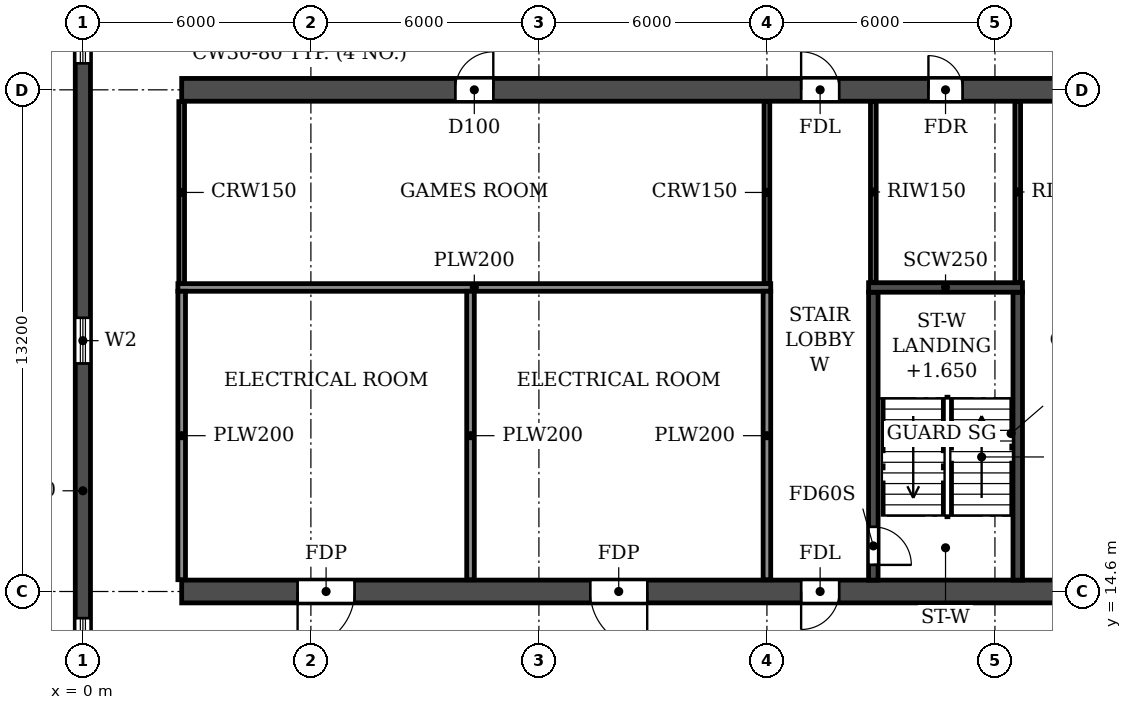
"""IFC4 building model, lengths in metres.
Left out: names, types, materials, properties, quantities, classifications, styles, units other than length and angle.
Written with IfcOpenShell. Run it as: python <this file> out.ifc"""

import sys

from ifc_helpers import new_model, si_unit, direction, frame, frame_2d, origin, place, context, subcontext, project, spatial, rectangle, extrude, element, fill, save


model = new_model("IFC4")
c1 = context("Model", 3, precision=1e-05, world=origin(), true_north=direction((0.0, 1.0)))
c2 = subcontext(c1, "Body", "Model", "MODEL_VIEW")
j1 = project(units=[si_unit("LENGTHUNIT", "METRE"), si_unit("PLANEANGLEUNIT", "RADIAN")], contexts=[c1])
p1 = place(None, origin())
s1 = spatial("IfcSite", under=j1, at=p1, CompositionType="ELEMENT")
p2 = place(p1, origin())
s2 = spatial("IfcBuilding", under=s1, at=p2, CompositionType="ELEMENT")
p3 = place(p2, frame((0.0, 0.0, 49.8)))
s3 = spatial("IfcBuildingStorey", under=s2, at=p3, CompositionType="ELEMENT", Elevation=49.8)
p4 = place(p3, frame((0.0, 4.683, 0.0), z_axis=(0.0, 0.0, 1.0), x_axis=(0.0, 1.0, 0.0)))
e1 = element("IfcWall", 1, at=p4, inside=s3, PredefinedType="SHEAR", context=c2, shape_type="SweptSolid", body=[
    extrude(rectangle(XDim=35.434, YDim=0.4, at=frame_2d((17.717, 0.0))), origin(), (0.0, 0.0, 1.0), 3.0),
])
p5 = place(p4, frame((23.817, 0.0, 0.9)))
e2 = element("IfcOpeningElement", 2, at=p5, cuts=e1, PredefinedType="OPENING", context=c2, shape_type="SweptSolid", body=[
    extrude(rectangle(XDim=1.2, YDim=1.5, at=frame_2d((0.6, 0.75))), frame((0.0, 0.21, 0.0), z_axis=(0.0, -1.0, 0.0), x_axis=(1.0, 0.0, 0.0)), (0.0, 0.0, 1.0), 0.42),
])
p6 = place(p4, frame((8.017, 0.0, 0.9)))
e3 = element("IfcOpeningElement", 3, at=p6, cuts=e1, PredefinedType="OPENING", context=c2, shape_type="SweptSolid", body=[
    extrude(rectangle(XDim=1.2, YDim=1.5, at=frame_2d((0.6, 0.75))), frame((0.0, 0.21, 0.0), z_axis=(0.0, -1.0, 0.0), x_axis=(1.0, 0.0, 0.0)), (0.0, 0.0, 1.0), 0.42),
])
p7 = place(p4, frame((15.917, 0.0, 0.9)))
e4 = element("IfcOpeningElement", 4, at=p7, cuts=e1, PredefinedType="OPENING", context=c2, shape_type="SweptSolid", body=[
    extrude(rectangle(XDim=1.2, YDim=1.5, at=frame_2d((0.6, 0.75))), frame((0.0, 0.21, 0.0), z_axis=(0.0, -1.0, 0.0), x_axis=(1.0, 0.0, 0.0)), (0.0, 0.0, 1.0), 0.42),
])
p8 = place(p4, frame((29.493, 0.0, 0.6)))
e5 = element("IfcOpeningElement", 5, at=p8, cuts=e1, PredefinedType="OPENING", context=c2, shape_type="SweptSolid", body=[
    extrude(rectangle(XDim=2.2, YDim=1.8, at=frame_2d((1.1, 0.9))), frame((0.0, 0.21, 0.0), z_axis=(0.0, -1.0, 0.0), x_axis=(1.0, 0.0, 0.0)), (0.0, 0.0, 1.0), 0.42),
])
p9 = place(p4, frame((2.541, 0.0, 0.6)))
e6 = element("IfcOpeningElement", 6, at=p9, cuts=e1, PredefinedType="OPENING", context=c2, shape_type="SweptSolid", body=[
    extrude(rectangle(XDim=2.2, YDim=1.8, at=frame_2d((1.1, 0.9))), frame((0.0, 0.21, 0.0), z_axis=(0.0, -1.0, 0.0), x_axis=(1.0, 0.0, 0.0)), (0.0, 0.0, 1.0), 0.42),
])
p10 = place(p3, frame((2.6, 14.6, 0.0), z_axis=(0.0, 0.0, 1.0), x_axis=(1.0, 0.0, 0.0)))
e7 = element("IfcWall", 7, at=p10, inside=s3, PredefinedType="SOLIDWALL", context=c2, shape_type="SweptSolid", body=[
    extrude(rectangle(XDim=96.8, YDim=0.6, at=frame_2d((48.4, 0.0))), origin(), (0.0, 0.0, 1.0), 3.0),
])
p11 = place(p10, frame((3.05, 0.0, 0.0)))
e8 = element("IfcOpeningElement", 8, at=p11, cuts=e7, PredefinedType="OPENING", context=c2, shape_type="SweptSolid", body=[
    extrude(rectangle(XDim=1.5, YDim=2.1, at=frame_2d((0.75, 1.05))), frame((0.0, 0.31, 0.0), z_axis=(0.0, -1.0, 0.0), x_axis=(1.0, 0.0, 0.0)), (0.0, 0.0, 1.0), 0.62),
])
p12 = place(p10, frame((10.75, 0.0, 0.0)))
e9 = element("IfcOpeningElement", 9, at=p12, cuts=e7, PredefinedType="OPENING", context=c2, shape_type="SweptSolid", body=[
    extrude(rectangle(XDim=1.5, YDim=2.1, at=frame_2d((0.75, 1.05))), frame((0.0, 0.31, 0.0), z_axis=(0.0, -1.0, 0.0), x_axis=(1.0, 0.0, 0.0)), (0.0, 0.0, 1.0), 0.62),
])
p13 = place(p10, frame((16.3, 0.0, 0.0)))
e10 = element("IfcOpeningElement", 10, at=p13, cuts=e7, PredefinedType="OPENING", context=c2, shape_type="SweptSolid", body=[
    extrude(rectangle(XDim=1.0, YDim=2.1, at=frame_2d((0.5, 1.05))), frame((0.0, 0.31, 0.0), z_axis=(0.0, -1.0, 0.0), x_axis=(1.0, 0.0, 0.0)), (0.0, 0.0, 1.0), 0.62),
])
p14 = place(p10, frame((24.2, 0.0, 0.0)))
e11 = element("IfcOpeningElement", 11, at=p14, cuts=e7, PredefinedType="OPENING", context=c2, shape_type="SweptSolid", body=[
    extrude(rectangle(XDim=1.0, YDim=2.1, at=frame_2d((0.5, 1.05))), frame((0.0, 0.31, 0.0), z_axis=(0.0, -1.0, 0.0), x_axis=(1.0, 0.0, 0.0)), (0.0, 0.0, 1.0), 0.62),
])
p15 = place(p10, frame((28.8, 0.0, 0.0)))
e12 = element("IfcOpeningElement", 12, at=p15, cuts=e7, PredefinedType="OPENING", context=c2, shape_type="SweptSolid", body=[
    extrude(rectangle(XDim=1.0, YDim=2.1, at=frame_2d((0.5, 1.05))), frame((0.0, 0.31, 0.0), z_axis=(0.0, -1.0, 0.0), x_axis=(1.0, 0.0, 0.0)), (0.0, 0.0, 1.0), 0.62),
])
p16 = place(p10, frame((42.7, 0.0, 0.0)))
e13 = element("IfcOpeningElement", 13, at=p16, cuts=e7, PredefinedType="OPENING", context=c2, shape_type="SweptSolid", body=[
    extrude(rectangle(XDim=1.0, YDim=2.1, at=frame_2d((0.5, 1.05))), frame((0.0, 0.31, 0.0), z_axis=(0.0, -1.0, 0.0), x_axis=(1.0, 0.0, 0.0)), (0.0, 0.0, 1.0), 0.62),
])
p17 = place(p10, frame((47.9, 0.0, 0.0)))
e14 = element("IfcOpeningElement", 14, at=p17, cuts=e7, PredefinedType="OPENING", context=c2, shape_type="SweptSolid", body=[
    extrude(rectangle(XDim=1.0, YDim=2.1, at=frame_2d((0.5, 1.05))), frame((0.0, 0.31, 0.0), z_axis=(0.0, -1.0, 0.0), x_axis=(1.0, 0.0, 0.0)), (0.0, 0.0, 1.0), 0.62),
])
p18 = place(p10, frame((51.8, 0.0, 0.0)))
e15 = element("IfcOpeningElement", 15, at=p18, cuts=e7, PredefinedType="OPENING", context=c2, shape_type="SweptSolid", body=[
    extrude(rectangle(XDim=1.0, YDim=2.1, at=frame_2d((0.5, 1.05))), frame((0.0, 0.31, 0.0), z_axis=(0.0, -1.0, 0.0), x_axis=(1.0, 0.0, 0.0)), (0.0, 0.0, 1.0), 0.62),
])
p19 = place(p10, frame((55.7, 0.0, 0.0)))
e16 = element("IfcOpeningElement", 16, at=p19, cuts=e7, PredefinedType="OPENING", context=c2, shape_type="SweptSolid", body=[
    extrude(rectangle(XDim=1.0, YDim=2.1, at=frame_2d((0.5, 1.05))), frame((0.0, 0.31, 0.0), z_axis=(0.0, -1.0, 0.0), x_axis=(1.0, 0.0, 0.0)), (0.0, 0.0, 1.0), 0.62),
])
p20 = place(p10, frame((67.0, 0.0, 0.0)))
e17 = element("IfcOpeningElement", 17, at=p20, cuts=e7, PredefinedType="OPENING", context=c2, shape_type="SweptSolid", body=[
    extrude(rectangle(XDim=1.0, YDim=2.1, at=frame_2d((0.5, 1.05))), frame((0.0, 0.31, 0.0), z_axis=(0.0, -1.0, 0.0), x_axis=(1.0, 0.0, 0.0)), (0.0, 0.0, 1.0), 0.62),
])
p21 = place(p10, frame((71.6, 0.0, 0.0)))
e18 = element("IfcOpeningElement", 18, at=p21, cuts=e7, PredefinedType="OPENING", context=c2, shape_type="SweptSolid", body=[
    extrude(rectangle(XDim=1.0, YDim=2.1, at=frame_2d((0.5, 1.05))), frame((0.0, 0.31, 0.0), z_axis=(0.0, -1.0, 0.0), x_axis=(1.0, 0.0, 0.0)), (0.0, 0.0, 1.0), 0.62),
])
p22 = place(p10, frame((79.5, 0.0, 0.0)))
e19 = element("IfcOpeningElement", 19, at=p22, cuts=e7, PredefinedType="OPENING", context=c2, shape_type="SweptSolid", body=[
    extrude(rectangle(XDim=1.0, YDim=2.1, at=frame_2d((0.5, 1.05))), frame((0.0, 0.31, 0.0), z_axis=(0.0, -1.0, 0.0), x_axis=(1.0, 0.0, 0.0)), (0.0, 0.0, 1.0), 0.62),
])
p23 = place(p10, frame((84.05, 0.0, 0.0)))
e20 = element("IfcOpeningElement", 20, at=p23, cuts=e7, PredefinedType="OPENING", context=c2, shape_type="SweptSolid", body=[
    extrude(rectangle(XDim=1.0, YDim=2.1, at=frame_2d((0.5, 1.05))), frame((0.0, 0.31, 0.0), z_axis=(0.0, -1.0, 0.0), x_axis=(1.0, 0.0, 0.0)), (0.0, 0.0, 1.0), 0.62),
])
p24 = place(p10, frame((91.75, 0.0, 0.0)))
e21 = element("IfcOpeningElement", 21, at=p24, cuts=e7, PredefinedType="OPENING", context=c2, shape_type="SweptSolid", body=[
    extrude(rectangle(XDim=1.0, YDim=2.1, at=frame_2d((0.5, 1.05))), frame((0.0, 0.31, 0.0), z_axis=(0.0, -1.0, 0.0), x_axis=(1.0, 0.0, 0.0)), (0.0, 0.0, 1.0), 0.62),
])
p25 = place(p3, frame((2.6, 27.8, 0.0), z_axis=(0.0, 0.0, 1.0), x_axis=(1.0, 0.0, 0.0)))
e22 = element("IfcWall", 22, at=p25, inside=s3, PredefinedType="SOLIDWALL", context=c2, shape_type="SweptSolid", body=[
    extrude(rectangle(XDim=96.8, YDim=0.6, at=frame_2d((48.4, 0.0))), origin(), (0.0, 0.0, 1.0), 3.0),
])
p26 = place(p25, frame((7.2, 0.0, 0.0)))
e23 = element("IfcOpeningElement", 23, at=p26, cuts=e22, PredefinedType="OPENING", context=c2, shape_type="SweptSolid", body=[
    extrude(rectangle(XDim=1.0, YDim=2.1, at=frame_2d((0.5, 1.05))), frame((0.0, 0.31, 0.0), z_axis=(0.0, -1.0, 0.0), x_axis=(1.0, 0.0, 0.0)), (0.0, 0.0, 1.0), 0.62),
])
p27 = place(p25, frame((16.3, 0.0, 0.0)))
e24 = element("IfcOpeningElement", 24, at=p27, cuts=e22, PredefinedType="OPENING", context=c2, shape_type="SweptSolid", body=[
    extrude(rectangle(XDim=1.0, YDim=2.1, at=frame_2d((0.5, 1.05))), frame((0.0, 0.31, 0.0), z_axis=(0.0, -1.0, 0.0), x_axis=(1.0, 0.0, 0.0)), (0.0, 0.0, 1.0), 0.62),
])
p28 = place(p25, frame((19.65, 0.0, 0.0)))
e25 = element("IfcOpeningElement", 25, at=p28, cuts=e22, PredefinedType="OPENING", context=c2, shape_type="SweptSolid", body=[
    extrude(rectangle(XDim=0.9, YDim=2.1, at=frame_2d((0.45, 1.05))), frame((0.0, 0.31, 0.0), z_axis=(0.0, -1.0, 0.0), x_axis=(1.0, 0.0, 0.0)), (0.0, 0.0, 1.0), 0.62),
])
p29 = place(p25, frame((28.85, 0.0, 0.0)))
e26 = element("IfcOpeningElement", 26, at=p29, cuts=e22, PredefinedType="OPENING", context=c2, shape_type="SweptSolid", body=[
    extrude(rectangle(XDim=0.9, YDim=2.1, at=frame_2d((0.45, 1.05))), frame((0.0, 0.31, 0.0), z_axis=(0.0, -1.0, 0.0), x_axis=(1.0, 0.0, 0.0)), (0.0, 0.0, 1.0), 0.62),
])
p30 = place(p25, frame((33.3, 0.0, 0.0)))
e27 = element("IfcOpeningElement", 27, at=p30, cuts=e22, PredefinedType="OPENING", context=c2, shape_type="SweptSolid", body=[
    extrude(rectangle(XDim=1.0, YDim=2.1, at=frame_2d((0.5, 1.05))), frame((0.0, 0.31, 0.0), z_axis=(0.0, -1.0, 0.0), x_axis=(1.0, 0.0, 0.0)), (0.0, 0.0, 1.0), 0.62),
])
p31 = place(p25, frame((38.25, 0.0, 0.0)))
e28 = element("IfcOpeningElement", 28, at=p31, cuts=e22, PredefinedType="OPENING", context=c2, shape_type="SweptSolid", body=[
    extrude(rectangle(XDim=1.5, YDim=2.1, at=frame_2d((0.75, 1.05))), frame((0.0, 0.31, 0.0), z_axis=(0.0, -1.0, 0.0), x_axis=(1.0, 0.0, 0.0)), (0.0, 0.0, 1.0), 0.62),
])
p32 = place(p25, frame((45.0, 0.0, 0.0)))
e29 = element("IfcOpeningElement", 29, at=p32, cuts=e22, PredefinedType="OPENING", context=c2, shape_type="SweptSolid", body=[
    extrude(rectangle(XDim=1.0, YDim=2.1, at=frame_2d((0.5, 1.05))), frame((0.0, 0.31, 0.0), z_axis=(0.0, -1.0, 0.0), x_axis=(1.0, 0.0, 0.0)), (0.0, 0.0, 1.0), 0.62),
])
p33 = place(p25, frame((47.9, 0.0, 0.0)))
e30 = element("IfcOpeningElement", 30, at=p33, cuts=e22, PredefinedType="OPENING", context=c2, shape_type="SweptSolid", body=[
    extrude(rectangle(XDim=1.0, YDim=2.1, at=frame_2d((0.5, 1.05))), frame((0.0, 0.31, 0.0), z_axis=(0.0, -1.0, 0.0), x_axis=(1.0, 0.0, 0.0)), (0.0, 0.0, 1.0), 0.62),
])
p34 = place(p25, frame((52.1, 0.0, 0.0)))
e31 = element("IfcOpeningElement", 31, at=p34, cuts=e22, PredefinedType="OPENING", context=c2, shape_type="SweptSolid", body=[
    extrude(rectangle(XDim=1.0, YDim=2.1, at=frame_2d((0.5, 1.05))), frame((0.0, 0.31, 0.0), z_axis=(0.0, -1.0, 0.0), x_axis=(1.0, 0.0, 0.0)), (0.0, 0.0, 1.0), 0.62),
])
p35 = place(p25, frame((56.0, 0.0, 0.0)))
e32 = element("IfcOpeningElement", 32, at=p35, cuts=e22, PredefinedType="OPENING", context=c2, shape_type="SweptSolid", body=[
    extrude(rectangle(XDim=1.0, YDim=2.1, at=frame_2d((0.5, 1.05))), frame((0.0, 0.31, 0.0), z_axis=(0.0, -1.0, 0.0), x_axis=(1.0, 0.0, 0.0)), (0.0, 0.0, 1.0), 0.62),
])
p36 = place(p25, frame((61.2, 0.0, 0.0)))
e33 = element("IfcOpeningElement", 33, at=p36, cuts=e22, PredefinedType="OPENING", context=c2, shape_type="SweptSolid", body=[
    extrude(rectangle(XDim=1.0, YDim=2.1, at=frame_2d((0.5, 1.05))), frame((0.0, 0.31, 0.0), z_axis=(0.0, -1.0, 0.0), x_axis=(1.0, 0.0, 0.0)), (0.0, 0.0, 1.0), 0.62),
])
p37 = place(p25, frame((67.05, 0.0, 0.0)))
e34 = element("IfcOpeningElement", 34, at=p37, cuts=e22, PredefinedType="OPENING", context=c2, shape_type="SweptSolid", body=[
    extrude(rectangle(XDim=0.9, YDim=2.1, at=frame_2d((0.45, 1.05))), frame((0.0, 0.31, 0.0), z_axis=(0.0, -1.0, 0.0), x_axis=(1.0, 0.0, 0.0)), (0.0, 0.0, 1.0), 0.62),
])
p38 = place(p25, frame((76.25, 0.0, 0.0)))
e35 = element("IfcOpeningElement", 35, at=p38, cuts=e22, PredefinedType="OPENING", context=c2, shape_type="SweptSolid", body=[
    extrude(rectangle(XDim=0.9, YDim=2.1, at=frame_2d((0.45, 1.05))), frame((0.0, 0.31, 0.0), z_axis=(0.0, -1.0, 0.0), x_axis=(1.0, 0.0, 0.0)), (0.0, 0.0, 1.0), 0.62),
])
p39 = place(p25, frame((79.5, 0.0, 0.0)))
e36 = element("IfcOpeningElement", 36, at=p39, cuts=e22, PredefinedType="OPENING", context=c2, shape_type="SweptSolid", body=[
    extrude(rectangle(XDim=1.0, YDim=2.1, at=frame_2d((0.5, 1.05))), frame((0.0, 0.31, 0.0), z_axis=(0.0, -1.0, 0.0), x_axis=(1.0, 0.0, 0.0)), (0.0, 0.0, 1.0), 0.62),
])
p40 = place(p25, frame((84.05, 0.0, 0.0)))
e37 = element("IfcOpeningElement", 37, at=p40, cuts=e22, PredefinedType="OPENING", context=c2, shape_type="SweptSolid", body=[
    extrude(rectangle(XDim=1.0, YDim=2.1, at=frame_2d((0.5, 1.05))), frame((0.0, 0.31, 0.0), z_axis=(0.0, -1.0, 0.0), x_axis=(1.0, 0.0, 0.0)), (0.0, 0.0, 1.0), 0.62),
])
p41 = place(p25, frame((91.75, 0.0, 0.0)))
e38 = element("IfcOpeningElement", 38, at=p41, cuts=e22, PredefinedType="OPENING", context=c2, shape_type="SweptSolid", body=[
    extrude(rectangle(XDim=1.0, YDim=2.1, at=frame_2d((0.5, 1.05))), frame((0.0, 0.31, 0.0), z_axis=(0.0, -1.0, 0.0), x_axis=(1.0, 0.0, 0.0)), (0.0, 0.0, 1.0), 0.62),
])
p42 = place(p3, frame((20.8, 14.9, 0.0), z_axis=(0.0, 0.0, 1.0), x_axis=(0.0, 1.0, 0.0)))
e39 = element("IfcWall", 39, at=p42, inside=s3, PredefinedType="SOLIDWALL", context=c2, shape_type="SweptSolid", body=[
    extrude(rectangle(XDim=7.575, YDim=0.25, at=frame_2d((3.788, 0.0))), origin(), (0.0, 0.0, 1.0), 3.0),
])
p43 = place(p42, frame((0.4, 0.0, 0.0)))
e40 = element("IfcOpeningElement", 40, at=p43, cuts=e39, PredefinedType="OPENING", context=c2, shape_type="SweptSolid", body=[
    extrude(rectangle(XDim=1.0, YDim=2.1, at=frame_2d((0.5, 1.05))), frame((0.0, 0.135, 0.0), z_axis=(0.0, -1.0, 0.0), x_axis=(1.0, 0.0, 0.0)), (0.0, 0.0, 1.0), 0.27),
])
p44 = place(p3, frame((24.6, 14.9, 0.0), z_axis=(0.0, 0.0, 1.0), x_axis=(0.0, 1.0, 0.0)))
e41 = element("IfcWall", 41, at=p44, inside=s3, PredefinedType="SOLIDWALL", context=c2, shape_type="SweptSolid", body=[
    extrude(rectangle(XDim=7.575, YDim=0.25, at=frame_2d((3.788, 0.0))), origin(), (0.0, 0.0, 1.0), 3.0),
])
p45 = place(p3, frame((20.675, 22.6, 0.0), z_axis=(0.0, 0.0, 1.0), x_axis=(1.0, 0.0, 0.0)))
e42 = element("IfcWall", 42, at=p45, inside=s3, PredefinedType="SOLIDWALL", context=c2, shape_type="SweptSolid", body=[
    extrude(rectangle(XDim=4.05, YDim=0.25, at=frame_2d((2.025, 0.0))), origin(), (0.0, 0.0, 1.0), 3.0),
])
for number, where, z_axis, x_axis in (
    (43, (2.6, 22.7, 0.0), (0.0, 0.0, 1.0), (0.0, 1.0, 0.0)),
    (44, (18.0, 22.7, 0.0), (0.0, 0.0, 1.0), (0.0, 1.0, 0.0)),
):
    element("IfcWall", number, at=place(p3, frame(where, z_axis=z_axis, x_axis=x_axis)), inside=s3, PredefinedType="PARTITIONING", context=c2, shape_type="SweptSolid", body=[
        extrude(rectangle(XDim=4.79, YDim=0.15, at=frame_2d((2.395, 0.0))), origin(), (0.0, 0.0, 1.0), 3.0),
    ])
p46 = place(p3, frame((2.5, 22.6, 0.0), z_axis=(0.0, 0.0, 1.0), x_axis=(1.0, 0.0, 0.0)))
e45 = element("IfcWall", 45, at=p46, inside=s3, PredefinedType="PARTITIONING", context=c2, shape_type="SweptSolid", body=[
    extrude(rectangle(XDim=15.6, YDim=0.2, at=frame_2d((7.8, 0.0))), origin(), (0.0, 0.0, 1.0), 3.0),
])
for number, where, z_axis, x_axis in (
    (46, (2.6, 14.91, 0.0), (0.0, 0.0, 1.0), (0.0, 1.0, 0.0)),
    (47, (10.2, 14.91, 0.0), (0.0, 0.0, 1.0), (0.0, 1.0, 0.0)),
    (48, (18.0, 14.91, 0.0), (0.0, 0.0, 1.0), (0.0, 1.0, 0.0)),
):
    element("IfcWall", number, at=place(p3, frame(where, z_axis=z_axis, x_axis=x_axis)), inside=s3, PredefinedType="PARTITIONING", context=c2, shape_type="SweptSolid", body=[
        extrude(rectangle(XDim=7.59, YDim=0.2, at=frame_2d((3.795, 0.0))), origin(), (0.0, 0.0, 1.0), 3.0),
    ])
for number, where, z_axis, x_axis in (
    (49, (20.8, 22.735, 0.0), (0.0, 0.0, 1.0), (0.0, 1.0, 0.0)),
    (50, (24.6, 22.735, 0.0), (0.0, 0.0, 1.0), (0.0, 1.0, 0.0)),
):
    element("IfcWall", number, at=place(p3, frame(where, z_axis=z_axis, x_axis=x_axis)), inside=s3, PredefinedType="PARTITIONING", context=c2, shape_type="SweptSolid", body=[
        extrude(rectangle(XDim=4.755, YDim=0.15, at=frame_2d((2.377, 0.0))), origin(), (0.0, 0.0, 1.0), 3.0),
    ])
p47 = place(p5, origin())
e51 = element("IfcWindow", 51, at=p47, inside=s3, PartitioningType="SINGLE_PANEL", PredefinedType="WINDOW", context=c2, shape_type="SweptSolid", body=[
    extrude(rectangle(XDim=1.2, YDim=1.5, at=frame_2d((0.6, 0.75))), frame((0.0, 0.03, 0.0), z_axis=(0.0, -1.0, 0.0), x_axis=(1.0, 0.0, 0.0)), (0.0, 0.0, 1.0), 0.06),
])
fill(e2, e51)
p48 = place(p6, origin())
e52 = element("IfcWindow", 52, at=p48, inside=s3, PartitioningType="SINGLE_PANEL", PredefinedType="WINDOW", context=c2, shape_type="SweptSolid", body=[
    extrude(rectangle(XDim=1.2, YDim=1.5, at=frame_2d((0.6, 0.75))), frame((0.0, 0.03, 0.0), z_axis=(0.0, -1.0, 0.0), x_axis=(1.0, 0.0, 0.0)), (0.0, 0.0, 1.0), 0.06),
])
fill(e3, e52)
p49 = place(p7, origin())
e53 = element("IfcWindow", 53, at=p49, inside=s3, PartitioningType="SINGLE_PANEL", PredefinedType="WINDOW", context=c2, shape_type="SweptSolid", body=[
    extrude(rectangle(XDim=1.2, YDim=1.5, at=frame_2d((0.6, 0.75))), frame((0.0, 0.03, 0.0), z_axis=(0.0, -1.0, 0.0), x_axis=(1.0, 0.0, 0.0)), (0.0, 0.0, 1.0), 0.06),
])
fill(e4, e53)
p50 = place(p26, origin())
e54 = element("IfcDoor", 54, at=p50, inside=s3, OperationType="SINGLE_SWING_RIGHT", PredefinedType="DOOR", context=c2, shape_type="SweptSolid", body=[
    extrude(rectangle(XDim=1.0, YDim=2.1, at=frame_2d((0.5, 1.05))), frame((0.0, 0.025, 0.0), z_axis=(0.0, -1.0, 0.0), x_axis=(1.0, 0.0, 0.0)), (0.0, 0.0, 1.0), 0.05),
])
fill(e23, e54)
p51 = place(p27, origin())
e55 = element("IfcDoor", 55, at=p51, inside=s3, OperationType="SINGLE_SWING_LEFT", PredefinedType="DOOR", context=c2, shape_type="SweptSolid", body=[
    extrude(rectangle(XDim=1.0, YDim=2.1, at=frame_2d((0.5, 1.05))), frame((0.0, 0.025, 0.0), z_axis=(0.0, -1.0, 0.0), x_axis=(1.0, 0.0, 0.0)), (0.0, 0.0, 1.0), 0.05),
])
fill(e24, e55)
p52 = place(p28, origin())
e56 = element("IfcDoor", 56, at=p52, inside=s3, OperationType="SINGLE_SWING_LEFT", PredefinedType="DOOR", context=c2, shape_type="SweptSolid", body=[
    extrude(rectangle(XDim=0.9, YDim=2.1, at=frame_2d((0.45, 1.05))), frame((0.0, 0.025, 0.0), z_axis=(0.0, -1.0, 0.0), x_axis=(1.0, 0.0, 0.0)), (0.0, 0.0, 1.0), 0.05),
])
fill(e25, e56)
p53 = place(p11, frame((1.5, 0.0, 0.0), z_axis=(0.0, 0.0, 1.0), x_axis=(-1.0, 0.0, 0.0)))
e57 = element("IfcDoor", 57, at=p53, inside=s3, OperationType="DOUBLE_DOOR_SINGLE_SWING", PredefinedType="DOOR", context=c2, shape_type="SweptSolid", body=[
    extrude(rectangle(XDim=1.5, YDim=2.1, at=frame_2d((0.75, 1.05))), frame((0.0, 0.025, 0.0), z_axis=(0.0, -1.0, 0.0), x_axis=(1.0, 0.0, 0.0)), (0.0, 0.0, 1.0), 0.05),
])
fill(e8, e57)
p54 = place(p12, frame((1.5, 0.0, 0.0), z_axis=(0.0, 0.0, 1.0), x_axis=(-1.0, 0.0, 0.0)))
e58 = element("IfcDoor", 58, at=p54, inside=s3, OperationType="DOUBLE_DOOR_SINGLE_SWING", PredefinedType="DOOR", context=c2, shape_type="SweptSolid", body=[
    extrude(rectangle(XDim=1.5, YDim=2.1, at=frame_2d((0.75, 1.05))), frame((0.0, 0.025, 0.0), z_axis=(0.0, -1.0, 0.0), x_axis=(1.0, 0.0, 0.0)), (0.0, 0.0, 1.0), 0.05),
])
fill(e9, e58)
p55 = place(p13, frame((1.0, 0.0, 0.0), z_axis=(0.0, 0.0, 1.0), x_axis=(-1.0, 0.0, 0.0)))
e59 = element("IfcDoor", 59, at=p55, inside=s3, OperationType="SINGLE_SWING_RIGHT", PredefinedType="DOOR", context=c2, shape_type="SweptSolid", body=[
    extrude(rectangle(XDim=1.0, YDim=2.1, at=frame_2d((0.5, 1.05))), frame((0.0, 0.025, 0.0), z_axis=(0.0, -1.0, 0.0), x_axis=(1.0, 0.0, 0.0)), (0.0, 0.0, 1.0), 0.05),
])
fill(e10, e59)
p56 = place(p43, frame((1.0, 0.0, 0.0), z_axis=(0.0, 0.0, 1.0), x_axis=(-1.0, 0.0, 0.0)))
e60 = element("IfcDoor", 60, at=p56, inside=s3, OperationType="SINGLE_SWING_RIGHT", PredefinedType="DOOR", context=c2, shape_type="SweptSolid", body=[
    extrude(rectangle(XDim=1.0, YDim=2.1, at=frame_2d((0.5, 1.05))), frame((0.0, 0.025, 0.0), z_axis=(0.0, -1.0, 0.0), x_axis=(1.0, 0.0, 0.0)), (0.0, 0.0, 1.0), 0.05),
])
fill(e40, e60)
save(model, sys.argv[1])
